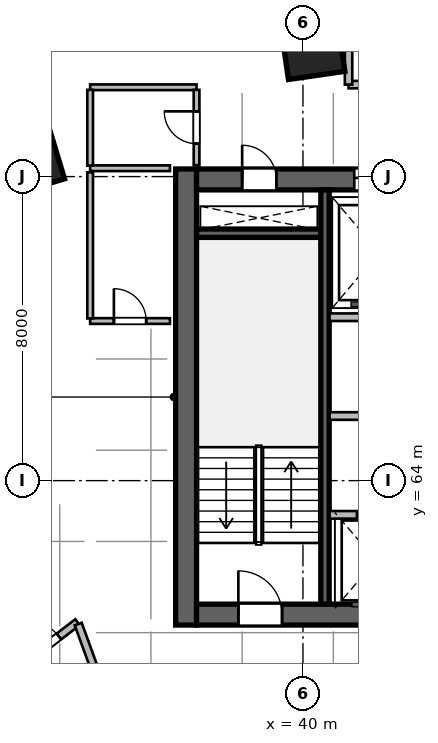
"""IFC4 building model, lengths in metres.
Left out: names, types, materials, properties, quantities, classifications, styles, units other than length and angle.
Written with IfcOpenShell. Run it as: python <this file> out.ifc"""

import sys

from ifc_helpers import new_model, si_unit, direction, frame, frame_2d, origin, origin_2d, place, context, subcontext, project, spatial, rectangle, extrude, source, transform, mapped, element, fill, save


model = new_model("IFC4")
c1 = context("Model", 3, precision=1e-05, world=origin(), true_north=direction((0.0, 1.0)))
c2 = subcontext(c1, "Body", "Model", "MODEL_VIEW")
j1 = project(units=[si_unit("LENGTHUNIT", "METRE"), si_unit("PLANEANGLEUNIT", "RADIAN")], contexts=[c1])
p1 = place(None, origin())
s1 = spatial("IfcSite", under=j1, at=p1, CompositionType="ELEMENT")
p2 = place(p1, origin())
s2 = spatial("IfcBuilding", under=s1, at=p2, CompositionType="ELEMENT")
p3 = place(p2, frame((0.0, 0.0, 42.6)))
s3 = spatial("IfcBuildingStorey", under=s2, at=p3, CompositionType="ELEMENT", Elevation=42.6)
m1 = source(origin(), c2, "Body", "SweptSolid", [
    extrude(rectangle(XDim=12.0, YDim=0.55, at=frame_2d((6.0, 0.0))), origin(), (0.0, 0.0, 1.0), 3.6),
])
p4 = place(p3, frame((36.925, 60.2, 0.0), z_axis=(0.0, 0.0, 1.0), x_axis=(0.0, 1.0, 0.0)))
e1 = element("IfcWall", 1, at=p4, inside=s3, PredefinedType="SHEAR", context=c2, shape_type="MappedRepresentation", body=[
    mapped(m1, transform((0.0, 0.0, 0.0), scale=1.0)),
])
m2 = source(origin(), c2, "Body", "SweptSolid", [
    extrude(rectangle(XDim=21.6, YDim=0.55, at=frame_2d((10.8, 0.0))), origin(), (0.0, 0.0, 1.0), 3.6),
])
p5 = place(p3, frame((37.2, 60.475, 0.0), z_axis=(0.0, 0.0, 1.0), x_axis=(1.0, 0.0, 0.0)))
e2 = element("IfcWall", 2, at=p5, inside=s3, PredefinedType="SHEAR", context=c2, shape_type="MappedRepresentation", body=[
    mapped(m2, transform((0.0, 0.0, 0.0), scale=1.0)),
])
p6 = place(p5, frame((1.1, 0.0, 0.0)))
e3 = element("IfcOpeningElement", 3, at=p6, cuts=e2, PredefinedType="OPENING", context=c2, shape_type="SweptSolid", body=[
    extrude(rectangle(XDim=1.15, YDim=2.15, at=frame_2d((0.575, 1.075))), frame((0.0, 0.285, 0.0), z_axis=(0.0, -1.0, 0.0), x_axis=(1.0, 0.0, 0.0)), (0.0, 0.0, 1.0), 0.57),
])
p7 = place(p5, frame((19.5, 0.0, 0.0)))
e4 = element("IfcOpeningElement", 4, at=p7, cuts=e2, PredefinedType="OPENING", context=c2, shape_type="SweptSolid", body=[
    extrude(rectangle(XDim=0.9, YDim=2.1, at=frame_2d((0.45, 1.05))), frame((0.0, 0.285, 0.0), z_axis=(0.0, -1.0, 0.0), x_axis=(1.0, 0.0, 0.0)), (0.0, 0.0, 1.0), 0.57),
])
p8 = place(p5, frame((12.02, 0.0, 0.0)))
e5 = element("IfcOpeningElement", 5, at=p8, cuts=e2, PredefinedType="OPENING", context=c2, shape_type="SweptSolid", body=[
    extrude(rectangle(XDim=1.6, YDim=2.15, at=frame_2d((0.8, 1.075))), frame((0.0, 0.285, 0.0), z_axis=(0.0, -1.0, 0.0), x_axis=(1.0, 0.0, 0.0)), (0.0, 0.0, 1.0), 0.57),
])
p9 = place(p3, frame((37.2, 71.925, 0.0), z_axis=(0.0, 0.0, 1.0), x_axis=(1.0, 0.0, 0.0)))
e6 = element("IfcWall", 6, at=p9, inside=s3, PredefinedType="SHEAR", context=c2, shape_type="MappedRepresentation", body=[
    mapped(m2, transform((0.0, 0.0, 0.0), scale=1.0)),
])
p10 = place(p9, frame((1.2, 0.0, 0.0)))
e7 = element("IfcOpeningElement", 7, at=p10, cuts=e6, PredefinedType="OPENING", context=c2, shape_type="SweptSolid", body=[
    extrude(rectangle(XDim=0.9, YDim=2.1, at=frame_2d((0.45, 1.05))), frame((0.0, 0.285, 0.0), z_axis=(0.0, -1.0, 0.0), x_axis=(1.0, 0.0, 0.0)), (0.0, 0.0, 1.0), 0.57),
])
p11 = place(p9, frame((14.7, 0.0, 0.0)))
e8 = element("IfcOpeningElement", 8, at=p11, cuts=e6, PredefinedType="OPENING", context=c2, shape_type="SweptSolid", body=[
    extrude(rectangle(XDim=1.2, YDim=2.15, at=frame_2d((0.6, 1.075))), frame((0.0, 0.285, 0.0), z_axis=(0.0, -1.0, 0.0), x_axis=(1.0, 0.0, 0.0)), (0.0, 0.0, 1.0), 0.57),
])
p12 = place(p9, frame((4.15, 0.0, 0.0)))
e9 = element("IfcOpeningElement", 9, at=p12, cuts=e6, PredefinedType="OPENING", context=c2, shape_type="SweptSolid", body=[
    extrude(rectangle(XDim=1.3, YDim=2.15, at=frame_2d((0.65, 1.075))), frame((0.0, 0.285, 0.0), z_axis=(0.0, -1.0, 0.0), x_axis=(1.0, 0.0, 0.0)), (0.0, 0.0, 1.0), 0.57),
])
p13 = place(p9, frame((7.25, 0.0, 0.0)))
e10 = element("IfcOpeningElement", 10, at=p13, cuts=e6, PredefinedType="OPENING", context=c2, shape_type="SweptSolid", body=[
    extrude(rectangle(XDim=0.9, YDim=2.1, at=frame_2d((0.45, 1.05))), frame((0.0, 0.285, 0.0), z_axis=(0.0, -1.0, 0.0), x_axis=(1.0, 0.0, 0.0)), (0.0, 0.0, 1.0), 0.57),
])
p14 = place(p9, frame((10.95, 0.0, 0.0)))
e11 = element("IfcOpeningElement", 11, at=p14, cuts=e6, PredefinedType="OPENING", context=c2, shape_type="SweptSolid", body=[
    extrude(rectangle(XDim=0.9, YDim=2.1, at=frame_2d((0.45, 1.05))), frame((0.0, 0.285, 0.0), z_axis=(0.0, -1.0, 0.0), x_axis=(1.0, 0.0, 0.0)), (0.0, 0.0, 1.0), 0.57),
])
m3 = source(origin(), c2, "Body", "SweptSolid", [
    extrude(rectangle(XDim=3.27, YDim=0.22, at=frame_2d((1.635, 0.0))), origin(), (0.0, 0.0, 1.0), 3.6),
])
p15 = place(p3, frame((37.2, 70.51, 0.0), z_axis=(0.0, 0.0, 1.0), x_axis=(1.0, 0.0, 0.0)))
e12 = element("IfcWall", 12, at=p15, inside=s3, PredefinedType="SHEAR", context=c2, shape_type="MappedRepresentation", body=[
    mapped(m3, transform((0.0, 0.0, 0.0), scale=1.0)),
])
m4 = source(origin(), c2, "Body", "SweptSolid", [
    extrude(rectangle(XDim=10.9, YDim=0.22, at=frame_2d((5.45, 0.0))), origin(), (0.0, 0.0, 1.0), 3.6),
])
p16 = place(p3, frame((40.58, 60.75, 0.0), z_axis=(0.0, 0.0, 1.0), x_axis=(0.0, 1.0, 0.0)))
e13 = element("IfcWall", 13, at=p16, inside=s3, PredefinedType="SHEAR", context=c2, shape_type="MappedRepresentation", body=[
    mapped(m4, transform((0.0, 0.0, 0.0), scale=1.0)),
])
m5 = source(origin(), c2, "Body", "SweptSolid", [
    extrude(rectangle(XDim=1.5, YDim=1.5, at=origin_2d()), origin(), (0.0, 0.0, 1.0), 3.6),
])
for number, where, z_axis, x_axis in (
    (14, (32.791, 72.442, 0.0), (0.0, 0.0, 1.0), (-0.289, 0.957, 0.0)),
    (15, (40.253, 75.404, 0.0), (0.0, 0.0, 1.0), (-0.143, 0.99, 0.0)),
):
    element("IfcColumn", number, at=place(p3, frame(where, z_axis=z_axis, x_axis=x_axis)), inside=s3, PredefinedType="COLUMN", context=c2, shape_type="MappedRepresentation", body=[
        mapped(m5, transform((0.0, 0.0, 0.0), scale=1.0)),
    ])
m6 = source(origin(), c2, "Body", "SweptSolid", [
    extrude(rectangle(XDim=8.8, YDim=0.2, at=frame_2d((4.4, 0.0))), origin(), (0.0, 0.0, 1.0), 3.36),
])
p17 = place(p3, frame((40.7, 68.3, 0.0), z_axis=(0.0, 0.0, 1.0), x_axis=(1.0, 0.0, 0.0)))
e16 = element("IfcWall", 16, at=p17, inside=s3, PredefinedType="SOLIDWALL", context=c2, shape_type="MappedRepresentation", body=[
    mapped(m6, transform((0.0, 0.0, 0.0), scale=1.0)),
])
m7 = source(origin(), c2, "Body", "SweptSolid", [
    extrude(rectangle(XDim=8.02, YDim=0.2, at=frame_2d((4.01, 0.0))), origin(), (0.0, 0.0, 1.0), 3.36),
])
p18 = place(p3, frame((40.7, 63.1, 0.0), z_axis=(0.0, 0.0, 1.0), x_axis=(1.0, 0.0, 0.0)))
e17 = element("IfcWall", 17, at=p18, inside=s3, PredefinedType="SOLIDWALL", context=c2, shape_type="MappedRepresentation", body=[
    mapped(m7, transform((0.0, 0.0, 0.0), scale=1.0)),
])
p19 = place(p18, frame((0.72, 0.0, 0.0)))
e18 = element("IfcOpeningElement", 18, at=p19, cuts=e17, PredefinedType="OPENING", context=c2, shape_type="SweptSolid", body=[
    extrude(rectangle(XDim=1.0, YDim=2.15, at=frame_2d((0.5, 1.075))), frame((0.0, 0.11, 0.0), z_axis=(0.0, -1.0, 0.0), x_axis=(1.0, 0.0, 0.0)), (0.0, 0.0, 1.0), 0.22),
])
p20 = place(p18, frame((2.62, 0.0, 0.0)))
e19 = element("IfcOpeningElement", 19, at=p20, cuts=e17, PredefinedType="OPENING", context=c2, shape_type="SweptSolid", body=[
    extrude(rectangle(XDim=1.0, YDim=2.15, at=frame_2d((0.5, 1.075))), frame((0.0, 0.11, 0.0), z_axis=(0.0, -1.0, 0.0), x_axis=(1.0, 0.0, 0.0)), (0.0, 0.0, 1.0), 0.22),
])
p21 = place(p18, frame((4.55, 0.0, 0.0)))
e20 = element("IfcOpeningElement", 20, at=p21, cuts=e17, PredefinedType="OPENING", context=c2, shape_type="SweptSolid", body=[
    extrude(rectangle(XDim=1.0, YDim=2.15, at=frame_2d((0.5, 1.075))), frame((0.0, 0.11, 0.0), z_axis=(0.0, -1.0, 0.0), x_axis=(1.0, 0.0, 0.0)), (0.0, 0.0, 1.0), 0.22),
])
p22 = place(p18, frame((6.55, 0.0, 0.0)))
e21 = element("IfcOpeningElement", 21, at=p22, cuts=e17, PredefinedType="OPENING", context=c2, shape_type="SweptSolid", body=[
    extrude(rectangle(XDim=1.0, YDim=2.15, at=frame_2d((0.5, 1.075))), frame((0.0, 0.11, 0.0), z_axis=(0.0, -1.0, 0.0), x_axis=(1.0, 0.0, 0.0)), (0.0, 0.0, 1.0), 0.22),
])
p23 = place(p3, frame((40.7, 65.7, 0.0), z_axis=(0.0, 0.0, 1.0), x_axis=(1.0, 0.0, 0.0)))
e22 = element("IfcWall", 22, at=p23, inside=s3, PredefinedType="SOLIDWALL", context=c2, shape_type="MappedRepresentation", body=[
    mapped(m6, transform((0.0, 0.0, 0.0), scale=1.0)),
])
p24 = place(p23, frame((1.6, 0.0, 0.0)))
e23 = element("IfcOpeningElement", 23, at=p24, cuts=e22, PredefinedType="OPENING", context=c2, shape_type="SweptSolid", body=[
    extrude(rectangle(XDim=0.9, YDim=2.1, at=frame_2d((0.45, 1.05))), frame((0.0, 0.11, 0.0), z_axis=(0.0, -1.0, 0.0), x_axis=(1.0, 0.0, 0.0)), (0.0, 0.0, 1.0), 0.22),
])
p25 = place(p23, frame((6.1, 0.0, 0.0)))
e24 = element("IfcOpeningElement", 24, at=p25, cuts=e22, PredefinedType="OPENING", context=c2, shape_type="SweptSolid", body=[
    extrude(rectangle(XDim=0.9, YDim=2.1, at=frame_2d((0.45, 1.05))), frame((0.0, 0.11, 0.0), z_axis=(0.0, -1.0, 0.0), x_axis=(1.0, 0.0, 0.0)), (0.0, 0.0, 1.0), 0.22),
])
m8 = source(origin(), c2, "Body", "SweptSolid", [
    extrude(rectangle(XDim=2.1, YDim=0.15, at=frame_2d((1.05, 0.0))), origin(), (0.0, 0.0, 1.0), 3.36),
])
p26 = place(p3, frame((34.4, 72.22, 0.0), z_axis=(0.0, 0.0, 1.0), x_axis=(1.0, 0.0, 0.0)))
e25 = element("IfcWall", 25, at=p26, inside=s3, PredefinedType="PARTITIONING", context=c2, shape_type="MappedRepresentation", body=[
    mapped(m8, transform((0.0, 0.0, 0.0), scale=1.0)),
])
m9 = source(origin(), c2, "Body", "SweptSolid", [
    extrude(rectangle(XDim=2.8, YDim=0.15, at=frame_2d((1.4, 0.0))), origin(), (0.0, 0.0, 1.0), 3.36),
])
p27 = place(p3, frame((34.4, 74.35, 0.0), z_axis=(0.0, 0.0, 1.0), x_axis=(1.0, 0.0, 0.0)))
e26 = element("IfcWall", 26, at=p27, inside=s3, PredefinedType="PARTITIONING", context=c2, shape_type="MappedRepresentation", body=[
    mapped(m9, transform((0.0, 0.0, 0.0), scale=1.0)),
])
m10 = source(origin(), c2, "Body", "SweptSolid", [
    extrude(rectangle(XDim=1.995, YDim=0.15, at=frame_2d((0.998, 0.0))), origin(), (0.0, 0.0, 1.0), 3.36),
])
p28 = place(p3, frame((34.4, 72.288, 0.0), z_axis=(0.0, 0.0, 1.0), x_axis=(0.0, 1.0, 0.0)))
e27 = element("IfcWall", 27, at=p28, inside=s3, PredefinedType="PARTITIONING", context=c2, shape_type="MappedRepresentation", body=[
    mapped(m10, transform((0.0, 0.0, 0.0), scale=1.0)),
])
m11 = source(origin(), c2, "Body", "SweptSolid", [
    extrude(rectangle(XDim=1.982, YDim=0.15, at=frame_2d((0.991, 0.0))), origin(), (0.0, 0.0, 1.0), 3.36),
])
p29 = place(p3, frame((37.2, 72.3, 0.0), z_axis=(0.0, 0.0, 1.0), x_axis=(0.0, 1.0, 0.0)))
e28 = element("IfcWall", 28, at=p29, inside=s3, PredefinedType="PARTITIONING", context=c2, shape_type="MappedRepresentation", body=[
    mapped(m11, transform((0.0, 0.0, 0.0), scale=1.0)),
])
p30 = place(p29, frame((0.566, 0.0, 0.0)))
e29 = element("IfcOpeningElement", 29, at=p30, cuts=e28, PredefinedType="OPENING", context=c2, shape_type="SweptSolid", body=[
    extrude(rectangle(XDim=0.85, YDim=2.1, at=frame_2d((0.425, 1.05))), frame((0.0, 0.085, 0.0), z_axis=(0.0, -1.0, 0.0), x_axis=(1.0, 0.0, 0.0)), (0.0, 0.0, 1.0), 0.17),
])
p31 = place(p3, frame((34.4, 68.2, 0.0), z_axis=(0.0, 0.0, 1.0), x_axis=(1.0, 0.0, 0.0)))
e30 = element("IfcWall", 30, at=p31, inside=s3, PredefinedType="PARTITIONING", context=c2, shape_type="MappedRepresentation", body=[
    mapped(m8, transform((0.0, 0.0, 0.0), scale=1.0)),
])
p32 = place(p31, frame((0.625, 0.0, 0.0)))
e31 = element("IfcOpeningElement", 31, at=p32, cuts=e30, PredefinedType="OPENING", context=c2, shape_type="SweptSolid", body=[
    extrude(rectangle(XDim=0.85, YDim=2.1, at=frame_2d((0.425, 1.05))), frame((0.0, 0.085, 0.0), z_axis=(0.0, -1.0, 0.0), x_axis=(1.0, 0.0, 0.0)), (0.0, 0.0, 1.0), 0.17),
])
m12 = source(origin(), c2, "Body", "SweptSolid", [
    extrude(rectangle(XDim=3.845, YDim=0.15, at=frame_2d((1.922, 0.0))), origin(), (0.0, 0.0, 1.0), 3.36),
])
p33 = place(p3, frame((34.4, 68.268, 0.0), z_axis=(0.0, 0.0, 1.0), x_axis=(0.0, 1.0, 0.0)))
e32 = element("IfcWall", 32, at=p33, inside=s3, PredefinedType="PARTITIONING", context=c2, shape_type="MappedRepresentation", body=[
    mapped(m12, transform((0.0, 0.0, 0.0), scale=1.0)),
])
m13 = source(origin(), c2, "Body", "SweptSolid", [
    extrude(rectangle(XDim=6.8, YDim=0.195, at=frame_2d((3.4, 0.0))), origin(), (0.0, 0.0, 1.0), 3.36),
])
p34 = place(p3, frame((41.2, 74.42, 0.0), z_axis=(0.0, 0.0, 1.0), x_axis=(1.0, 0.0, 0.0)))
e33 = element("IfcWall", 33, at=p34, inside=s3, PredefinedType="PARTITIONING", context=c2, shape_type="MappedRepresentation", body=[
    mapped(m13, transform((0.0, 0.0, 0.0), scale=1.0)),
])
p35 = place(p34, frame((1.429, 0.0, 0.0)))
e34 = element("IfcOpeningElement", 34, at=p35, cuts=e33, PredefinedType="OPENING", context=c2, shape_type="SweptSolid", body=[
    extrude(rectangle(XDim=0.95, YDim=2.15, at=frame_2d((0.475, 1.075))), frame((0.0, 0.107, 0.0), z_axis=(0.0, -1.0, 0.0), x_axis=(1.0, 0.0, 0.0)), (0.0, 0.0, 1.0), 0.215),
])
m14 = source(origin(), c2, "Body", "SweptSolid", [
    extrude(rectangle(XDim=5.426, YDim=0.195, at=frame_2d((2.713, 0.0))), origin(), (0.0, 0.0, 1.0), 3.36),
])
p36 = place(p3, frame((41.2, 74.42, 0.0), z_axis=(0.0, 0.0, 1.0), x_axis=(0.0, 1.0, 0.0)))
e35 = element("IfcWall", 35, at=p36, inside=s3, PredefinedType="PARTITIONING", context=c2, shape_type="MappedRepresentation", body=[
    mapped(m14, transform((0.0, 0.0, 0.0), scale=1.0)),
])
m15 = source(origin(), c2, "Body", "SweptSolid", [
    extrude(rectangle(XDim=4.546, YDim=0.195, at=frame_2d((2.273, 0.0))), origin(), (0.0, 0.0, 1.0), 3.36),
])
p37 = place(p3, frame((30.459, 57.511, 0.0), z_axis=(0.0, 0.0, 1.0), x_axis=(0.793907931297, 0.608037989457, 0.0)))
e36 = element("IfcWall", 36, at=p37, inside=s3, PredefinedType="PARTITIONING", context=c2, shape_type="MappedRepresentation", body=[
    mapped(m15, transform((0.0, 0.0, 0.0), scale=1.0)),
])
p38 = place(p37, frame((2.98, 0.0, 0.0)))
e37 = element("IfcOpeningElement", 37, at=p38, cuts=e36, PredefinedType="OPENING", context=c2, shape_type="SweptSolid", body=[
    extrude(rectangle(XDim=0.95, YDim=2.15, at=frame_2d((0.475, 1.075))), frame((0.0, 0.107, 0.0), z_axis=(0.0, -1.0, 0.0), x_axis=(1.0, 0.0, 0.0)), (0.0, 0.0, 1.0), 0.215),
])
m16 = source(origin(), c2, "Body", "SweptSolid", [
    extrude(rectangle(XDim=12.196, YDim=0.195, at=frame_2d((6.098, 0.0))), origin(), (0.0, 0.0, 1.0), 3.36),
])
p39 = place(p3, frame((38.258, 48.766, 0.0), z_axis=(0.0, 0.0, 1.0), x_axis=(-0.342022711534, 0.939691686031, 0.0)))
e38 = element("IfcWall", 38, at=p39, inside=s3, PredefinedType="PARTITIONING", context=c2, shape_type="MappedRepresentation", body=[
    mapped(m16, transform((0.0, 0.0, 0.0), scale=1.0)),
])
m17 = source(origin(), c2, "Body", "SweptSolid", [
    extrude(rectangle(XDim=1.15, YDim=2.15, at=frame_2d((0.575, 1.075))), frame((0.0, 0.025, 0.0), z_axis=(0.0, -1.0, 0.0), x_axis=(1.0, 0.0, 0.0)), (0.0, 0.0, 1.0), 0.05),
])
p40 = place(p6, origin())
e39 = element("IfcDoor", 39, at=p40, inside=s3, OperationType="SINGLE_SWING_LEFT", PredefinedType="DOOR", context=c2, shape_type="MappedRepresentation", body=[
    mapped(m17, transform((0.0, 0.0, 0.0), scale=1.0)),
])
fill(e3, e39)
m18 = source(origin(), c2, "Body", "SweptSolid", [
    extrude(rectangle(XDim=0.9, YDim=2.1, at=frame_2d((0.45, 1.05))), frame((0.0, 0.025, 0.0), z_axis=(0.0, -1.0, 0.0), x_axis=(1.0, 0.0, 0.0)), (0.0, 0.0, 1.0), 0.05),
])
p41 = place(p10, origin())
e40 = element("IfcDoor", 40, at=p41, inside=s3, OperationType="SINGLE_SWING_LEFT", PredefinedType="DOOR", context=c2, shape_type="MappedRepresentation", body=[
    mapped(m18, transform((0.0, 0.0, 0.0), scale=1.0)),
])
fill(e7, e40)
m19 = source(origin(), c2, "Body", "SweptSolid", [
    extrude(rectangle(XDim=1.3, YDim=2.15, at=frame_2d((0.65, 1.075))), frame((0.0, 0.025, 0.0), z_axis=(0.0, -1.0, 0.0), x_axis=(1.0, 0.0, 0.0)), (0.0, 0.0, 1.0), 0.05),
])
p42 = place(p12, origin())
e41 = element("IfcDoor", 41, at=p42, inside=s3, OperationType="DOUBLE_DOOR_SLIDING", PredefinedType="DOOR", context=c2, shape_type="MappedRepresentation", body=[
    mapped(m19, transform((0.0, 0.0, 0.0), scale=1.0)),
])
fill(e9, e41)
m20 = source(origin(), c2, "Body", "SweptSolid", [
    extrude(rectangle(XDim=1.0, YDim=2.15, at=frame_2d((0.5, 1.075))), frame((0.0, 0.025, 0.0), z_axis=(0.0, -1.0, 0.0), x_axis=(1.0, 0.0, 0.0)), (0.0, 0.0, 1.0), 0.05),
])
p43 = place(p19, origin())
e42 = element("IfcDoor", 42, at=p43, inside=s3, OperationType="DOUBLE_DOOR_SLIDING", PredefinedType="DOOR", context=c2, shape_type="MappedRepresentation", body=[
    mapped(m20, transform((0.0, 0.0, 0.0), scale=1.0)),
])
fill(e18, e42)
m21 = source(origin(), c2, "Body", "SweptSolid", [
    extrude(rectangle(XDim=0.85, YDim=2.1, at=frame_2d((0.425, 1.05))), frame((0.0, 0.025, 0.0), z_axis=(0.0, -1.0, 0.0), x_axis=(1.0, 0.0, 0.0)), (0.0, 0.0, 1.0), 0.05),
])
p44 = place(p30, origin())
e43 = element("IfcDoor", 43, at=p44, inside=s3, OperationType="SINGLE_SWING_RIGHT", PredefinedType="DOOR", context=c2, shape_type="MappedRepresentation", body=[
    mapped(m21, transform((0.0, 0.0, 0.0), scale=1.0)),
])
fill(e29, e43)
p45 = place(p32, origin())
e44 = element("IfcDoor", 44, at=p45, inside=s3, OperationType="SINGLE_SWING_LEFT", PredefinedType="DOOR", context=c2, shape_type="MappedRepresentation", body=[
    mapped(m21, transform((0.0, 0.0, 0.0), scale=1.0)),
])
fill(e31, e44)
m22 = source(origin(), c2, "Body", "SweptSolid", [
    extrude(rectangle(XDim=0.95, YDim=2.15, at=frame_2d((0.475, 1.075))), frame((0.0, 0.025, 0.0), z_axis=(0.0, -1.0, 0.0), x_axis=(1.0, 0.0, 0.0)), (0.0, 0.0, 1.0), 0.05),
])
p46 = place(p38, origin())
e45 = element("IfcDoor", 45, at=p46, inside=s3, OperationType="SINGLE_SWING_LEFT", PredefinedType="DOOR", context=c2, shape_type="MappedRepresentation", body=[
    mapped(m22, transform((0.0, 0.0, 0.0), scale=1.0)),
])
fill(e37, e45)
save(model, sys.argv[1])
